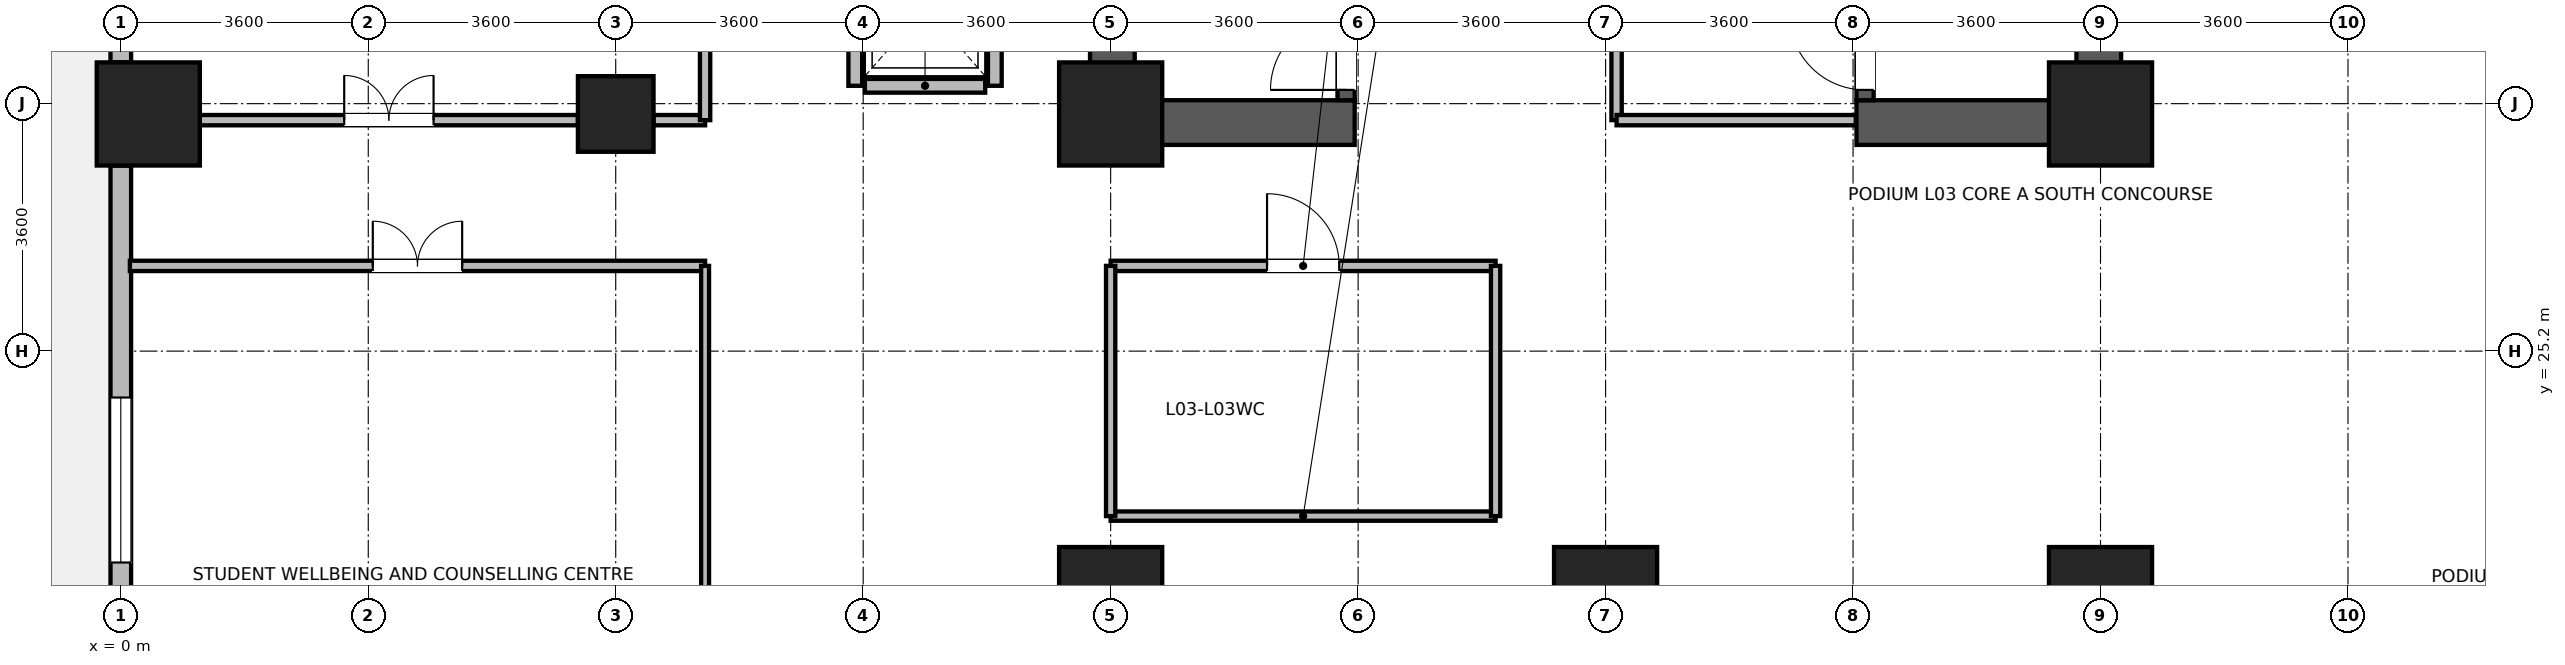
"""IFC4 building model, lengths in metres.
Left out: names, types, materials, properties, quantities, classifications, styles, units other than length and angle.
Written with IfcOpenShell. Run it as: python <this file> out.ifc"""

import sys

from ifc_helpers import new_model, si_unit, direction, frame, frame_2d, origin, origin_2d, place, context, subcontext, project, spatial, rectangle, circle, extrude, source, transform, mapped, element, fill, save


model = new_model("IFC4")
c1 = context("Model", 3, precision=1e-05, world=origin(), true_north=direction((0.0, 1.0)))
c2 = subcontext(c1, "Body", "Model", "MODEL_VIEW")
j1 = project(units=[si_unit("LENGTHUNIT", "METRE"), si_unit("PLANEANGLEUNIT", "RADIAN")], contexts=[c1])
p1 = place(None, origin())
s1 = spatial("IfcSite", under=j1, at=p1, CompositionType="ELEMENT")
p2 = place(p1, origin())
s2 = spatial("IfcBuilding", under=s1, at=p2, CompositionType="ELEMENT")
p3 = place(p2, frame((0.0, 0.0, 15.0)))
s3 = spatial("IfcBuildingStorey", under=s2, at=p3, CompositionType="ELEMENT", Elevation=15.0)
for number, where, z_axis, x_axis in (
    (1, (14.425, 28.2, 0.0), (0.0, 0.0, 1.0), (0.0, 1.0, 0.0)),
    (2, (28.775, 28.2, 0.0), (0.0, 0.0, 1.0), (0.0, 1.0, 0.0)),
):
    element("IfcWall", number, at=place(p3, frame(where, z_axis=z_axis, x_axis=x_axis)), inside=s3, PredefinedType="SHEAR", context=c2, shape_type="SweptSolid", body=[
        extrude(rectangle(XDim=8.3, YDim=0.65, at=frame_2d((4.15, 0.0))), origin(), (0.0, 0.0, 1.0), 4.38),
    ])
for number, where, z_axis, x_axis in (
    (3, (14.75, 28.525, 0.0), (0.0, 0.0, 1.0), (1.0, 0.0, 0.0)),
    (4, (25.25, 28.525, 0.0), (0.0, 0.0, 1.0), (1.0, 0.0, 0.0)),
):
    element("IfcWall", number, at=place(p3, frame(where, z_axis=z_axis, x_axis=x_axis)), inside=s3, PredefinedType="SHEAR", context=c2, shape_type="SweptSolid", body=[
        extrude(rectangle(XDim=3.2, YDim=0.65, at=frame_2d((1.6, 0.0))), origin(), (0.0, 0.0, 1.0), 4.38),
    ])
p4 = place(p3, frame((17.825, 28.85, 0.0), z_axis=(0.0, 0.0, 1.0), x_axis=(0.0, 1.0, 0.0)))
e5 = element("IfcWall", 5, at=p4, inside=s3, PredefinedType="SHEAR", context=c2, shape_type="SweptSolid", body=[
    extrude(rectangle(XDim=7.0, YDim=0.25, at=frame_2d((3.5, 0.0))), origin(), (0.0, 0.0, 1.0), 4.38),
])
p5 = place(p4, frame((0.15, 0.0, 0.0)))
e6 = element("IfcOpeningElement", 6, at=p5, cuts=e5, PredefinedType="OPENING", context=c2, shape_type="SweptSolid", body=[
    extrude(rectangle(XDim=1.1, YDim=2.08, at=frame_2d((0.55, 1.04))), frame((0.0, 0.135, 0.0), z_axis=(0.0, -1.0, 0.0), x_axis=(1.0, 0.0, 0.0)), (0.0, 0.0, 1.0), 0.27),
])
p6 = place(p3, frame((25.375, 28.85, 0.0), z_axis=(0.0, 0.0, 1.0), x_axis=(0.0, 1.0, 0.0)))
e7 = element("IfcWall", 7, at=p6, inside=s3, PredefinedType="SHEAR", context=c2, shape_type="SweptSolid", body=[
    extrude(rectangle(XDim=7.0, YDim=0.25, at=frame_2d((3.5, 0.0))), origin(), (0.0, 0.0, 1.0), 4.38),
])
p7 = place(p6, frame((0.15, 0.0, 0.0)))
e8 = element("IfcOpeningElement", 8, at=p7, cuts=e7, PredefinedType="OPENING", context=c2, shape_type="SweptSolid", body=[
    extrude(rectangle(XDim=1.1, YDim=2.08, at=frame_2d((0.55, 1.04))), frame((0.0, 0.135, 0.0), z_axis=(0.0, -1.0, 0.0), x_axis=(1.0, 0.0, 0.0)), (0.0, 0.0, 1.0), 0.27),
])
m1 = source(origin(), c2, "Body", "SweptSolid", [
    extrude(circle(Radius=0.55, at=origin_2d()), origin(), (0.0, 0.0, 1.0), 4.8),
])
p8 = place(p3, frame((7.2, 28.65, 0.0), z_axis=(0.0, 0.0, 1.0), x_axis=(1.0, 0.0, 0.0)))
e9 = element("IfcColumn", 9, at=p8, inside=s3, PredefinedType="COLUMN", context=c2, shape_type="MappedRepresentation", body=[
    mapped(m1, transform((0.0, 0.0, 0.0), x_axis=(1.0, 0.0, 0.0), y_axis=(0.0, 1.0, 0.0), z_axis=(0.0, 0.0, 1.0), scale=1.0)),
])
m2 = source(origin(), c2, "Body", "SweptSolid", [
    extrude(rectangle(XDim=1.5, YDim=1.5, at=origin_2d()), origin(), (0.0, 0.0, 1.0), 4.8),
])
for number, where, z_axis, x_axis in (
    (10, (14.4, 21.6, 0.0), (0.0, 0.0, 1.0), (1.0, 0.0, 0.0)),
    (11, (14.4, 28.65, 0.0), (0.0, 0.0, 1.0), (1.0, 0.0, 0.0)),
    (12, (21.6, 21.6, 0.0), (0.0, 0.0, 1.0), (1.0, 0.0, 0.0)),
    (13, (28.8, 21.6, 0.0), (0.0, 0.0, 1.0), (1.0, 0.0, 0.0)),
    (14, (28.8, 28.65, 0.0), (0.0, 0.0, 1.0), (1.0, 0.0, 0.0)),
    (15, (0.4, 28.65, 0.0), (0.0, 0.0, 1.0), (1.0, 0.0, 0.0)),
):
    element("IfcColumn", number, at=place(p3, frame(where, z_axis=z_axis, x_axis=x_axis)), inside=s3, PredefinedType="COLUMN", context=c2, shape_type="MappedRepresentation", body=[
        mapped(m2, transform((0.0, 0.0, 0.0), x_axis=(1.0, 0.0, 0.0), y_axis=(0.0, 1.0, 0.0), z_axis=(0.0, 0.0, 1.0), scale=1.0)),
    ])
p9 = place(p3, frame((0.0, 29.401, 0.0), z_axis=(0.0, 0.0, 1.0), x_axis=(0.0, 1.0, 0.0)))
e16 = element("IfcWall", 16, at=p9, inside=s3, PredefinedType="STANDARD", context=c2, shape_type="SweptSolid", body=[
    extrude(rectangle(XDim=5.998, YDim=0.3, at=frame_2d((2.999, 0.0))), origin(), (0.0, 0.0, 1.0), 4.36),
])
p10 = place(p9, frame((2.524, 0.0, 0.9)))
e17 = element("IfcOpeningElement", 17, at=p10, cuts=e16, PredefinedType="OPENING", context=c2, shape_type="SweptSolid", body=[
    extrude(rectangle(XDim=0.95, YDim=1.75, at=frame_2d((0.475, 0.875))), frame((0.0, 0.16, 0.0), z_axis=(0.0, -1.0, 0.0), x_axis=(1.0, 0.0, 0.0)), (0.0, 0.0, 1.0), 0.32),
])
p11 = place(p9, frame((1.037, 0.0, 0.9)))
e18 = element("IfcOpeningElement", 18, at=p11, cuts=e16, PredefinedType="OPENING", context=c2, shape_type="SweptSolid", body=[
    extrude(rectangle(XDim=0.95, YDim=1.75, at=frame_2d((0.475, 0.875))), frame((0.0, 0.16, 0.0), z_axis=(0.0, -1.0, 0.0), x_axis=(1.0, 0.0, 0.0)), (0.0, 0.0, 1.0), 0.32),
])
p12 = place(p3, frame((0.0, 18.751, 0.0), z_axis=(0.0, 0.0, 1.0), x_axis=(0.0, 1.0, 0.0)))
e19 = element("IfcWall", 19, at=p12, inside=s3, PredefinedType="STANDARD", context=c2, shape_type="SweptSolid", body=[
    extrude(rectangle(XDim=9.148, YDim=0.3, at=frame_2d((4.574, 0.0))), origin(), (0.0, 0.0, 1.0), 4.36),
])
p13 = place(p12, frame((0.325, 0.0, 0.9)))
e20 = element("IfcOpeningElement", 20, at=p13, cuts=e19, PredefinedType="OPENING", context=c2, shape_type="SweptSolid", body=[
    extrude(rectangle(XDim=2.4, YDim=2.5, at=frame_2d((1.2, 1.25))), frame((0.0, 0.16, 0.0), z_axis=(0.0, -1.0, 0.0), x_axis=(1.0, 0.0, 0.0)), (0.0, 0.0, 1.0), 0.32),
])
p14 = place(p12, frame((3.374, 0.0, 0.9)))
e21 = element("IfcOpeningElement", 21, at=p14, cuts=e19, PredefinedType="OPENING", context=c2, shape_type="SweptSolid", body=[
    extrude(rectangle(XDim=2.4, YDim=2.5, at=frame_2d((1.2, 1.25))), frame((0.0, 0.16, 0.0), z_axis=(0.0, -1.0, 0.0), x_axis=(1.0, 0.0, 0.0)), (0.0, 0.0, 1.0), 0.32),
])
p15 = place(p3, frame((10.825, 29.06, 0.0), z_axis=(0.0, 0.0, 1.0), x_axis=(1.0, 0.0, 0.0)))
e22 = element("IfcWall", 22, at=p15, inside=s3, PredefinedType="PARTITIONING", context=c2, shape_type="SweptSolid", body=[
    extrude(rectangle(XDim=1.75, YDim=0.2, at=frame_2d((0.875, 0.0))), origin(), (0.0, 0.0, 1.0), 4.36),
])
for number, where, z_axis, x_axis in (
    (23, (10.685, 29.06, 0.0), (0.0, 0.0, 1.0), (0.0, 1.0, 0.0)),
    (24, (12.715, 29.06, 0.0), (0.0, 0.0, 1.0), (0.0, 1.0, 0.0)),
):
    element("IfcWall", number, at=place(p3, frame(where, z_axis=z_axis, x_axis=x_axis)), inside=s3, PredefinedType="PARTITIONING", context=c2, shape_type="SweptSolid", body=[
        extrude(rectangle(XDim=2.28, YDim=0.2, at=frame_2d((1.14, 0.0))), origin(), (0.0, 0.0, 1.0), 4.36),
    ])
p16 = place(p3, frame((0.132, 26.44, 0.0), z_axis=(0.0, 0.0, 1.0), x_axis=(1.0, 0.0, 0.0)))
e25 = element("IfcWall", 25, at=p16, inside=s3, PredefinedType="PARTITIONING", context=c2, shape_type="SweptSolid", body=[
    extrude(rectangle(XDim=8.368, YDim=0.15, at=frame_2d((4.184, 0.0))), origin(), (0.0, 0.0, 1.0), 4.36),
])
p17 = place(p16, frame((3.534, 0.0, 0.0)))
e26 = element("IfcOpeningElement", 26, at=p17, cuts=e25, PredefinedType="OPENING", context=c2, shape_type="SweptSolid", body=[
    extrude(rectangle(XDim=1.3, YDim=2.12, at=frame_2d((0.65, 1.06))), frame((0.0, 0.085, 0.0), z_axis=(0.0, -1.0, 0.0), x_axis=(1.0, 0.0, 0.0)), (0.0, 0.0, 1.0), 0.17),
])
p18 = place(p3, frame((1.15, 28.56, 0.0), z_axis=(0.0, 0.0, 1.0), x_axis=(1.0, 0.0, 0.0)))
e27 = element("IfcWall", 27, at=p18, inside=s3, PredefinedType="PARTITIONING", context=c2, shape_type="SweptSolid", body=[
    extrude(rectangle(XDim=5.5, YDim=0.15, at=frame_2d((2.75, 0.0))), origin(), (0.0, 0.0, 1.0), 3.66),
])
p19 = place(p18, frame((2.1, 0.0, 0.0)))
e28 = element("IfcOpeningElement", 28, at=p19, cuts=e27, PredefinedType="OPENING", context=c2, shape_type="SweptSolid", body=[
    extrude(rectangle(XDim=1.3, YDim=2.12, at=frame_2d((0.65, 1.06))), frame((0.0, 0.085, 0.0), z_axis=(0.0, -1.0, 0.0), x_axis=(1.0, 0.0, 0.0)), (0.0, 0.0, 1.0), 0.17),
])
p20 = place(p3, frame((7.75, 28.56, 0.0), z_axis=(0.0, 0.0, 1.0), x_axis=(1.0, 0.0, 0.0)))
e29 = element("IfcWall", 29, at=p20, inside=s3, PredefinedType="PARTITIONING", context=c2, shape_type="SweptSolid", body=[
    extrude(rectangle(XDim=0.75, YDim=0.15, at=frame_2d((0.375, 0.0))), origin(), (0.0, 0.0, 1.0), 3.66),
])
p21 = place(p3, frame((8.5, 28.56, 0.0), z_axis=(0.0, 0.0, 1.0), x_axis=(0.0, 1.0, 0.0)))
e30 = element("IfcWall", 30, at=p21, inside=s3, PredefinedType="PARTITIONING", context=c2, shape_type="SweptSolid", body=[
    extrude(rectangle(XDim=7.68, YDim=0.15, at=frame_2d((3.84, 0.0))), origin(), (0.0, 0.0, 1.0), 4.36),
])
p22 = place(p3, frame((14.4, 26.44, 0.0), z_axis=(0.0, 0.0, 1.0), x_axis=(1.0, 0.0, 0.0)))
e31 = element("IfcWall", 31, at=p22, inside=s3, PredefinedType="PARTITIONING", context=c2, shape_type="SweptSolid", body=[
    extrude(rectangle(XDim=5.6, YDim=0.15, at=frame_2d((2.8, 0.0))), origin(), (0.0, 0.0, 1.0), 4.36),
])
p23 = place(p22, frame((2.275, 0.0, 0.0)))
e32 = element("IfcOpeningElement", 32, at=p23, cuts=e31, PredefinedType="OPENING", context=c2, shape_type="SweptSolid", body=[
    extrude(rectangle(XDim=1.05, YDim=2.12, at=frame_2d((0.525, 1.06))), frame((0.0, 0.085, 0.0), z_axis=(0.0, -1.0, 0.0), x_axis=(1.0, 0.0, 0.0)), (0.0, 0.0, 1.0), 0.17),
])
p24 = place(p3, frame((8.5, 18.132, 0.0), z_axis=(0.0, 0.0, 1.0), x_axis=(0.0, 1.0, 0.0)))
e33 = element("IfcWall", 33, at=p24, inside=s3, PredefinedType="PARTITIONING", context=c2, shape_type="SweptSolid", body=[
    extrude(rectangle(XDim=8.308, YDim=0.115, at=frame_2d((4.154, 0.0))), origin(), (0.0, 0.0, 1.0), 4.36),
])
p25 = place(p3, frame((14.4, 22.8, 0.0), z_axis=(0.0, 0.0, 1.0), x_axis=(1.0, 0.0, 0.0)))
e34 = element("IfcWall", 34, at=p25, inside=s3, PredefinedType="PARTITIONING", context=c2, shape_type="SweptSolid", body=[
    extrude(rectangle(XDim=5.6, YDim=0.135, at=frame_2d((2.8, 0.0))), origin(), (0.0, 0.0, 1.0), 4.36),
])
p26 = place(p3, frame((21.76, 28.56, 0.0), z_axis=(0.0, 0.0, 1.0), x_axis=(0.0, 1.0, 0.0)))
e35 = element("IfcWall", 35, at=p26, inside=s3, PredefinedType="PARTITIONING", context=c2, shape_type="SweptSolid", body=[
    extrude(rectangle(XDim=4.6, YDim=0.15, at=frame_2d((2.3, 0.0))), origin(), (0.0, 0.0, 1.0), 4.36),
])
p27 = place(p26, frame((1.55, 0.0, 0.0)))
e36 = element("IfcOpeningElement", 36, at=p27, cuts=e35, PredefinedType="OPENING", context=c2, shape_type="SweptSolid", body=[
    extrude(rectangle(XDim=1.5, YDim=2.1, at=frame_2d((0.75, 1.05))), frame((0.0, 0.085, 0.0), z_axis=(0.0, -1.0, 0.0), x_axis=(1.0, 0.0, 0.0)), (0.0, 0.0, 1.0), 0.17),
])
p28 = place(p3, frame((14.4, 22.8, 0.0), z_axis=(0.0, 0.0, 1.0), x_axis=(0.0, 1.0, 0.0)))
e37 = element("IfcWall", 37, at=p28, inside=s3, PredefinedType="PARTITIONING", context=c2, shape_type="SweptSolid", body=[
    extrude(rectangle(XDim=3.64, YDim=0.135, at=frame_2d((1.82, 0.0))), origin(), (0.0, 0.0, 1.0), 3.76),
])
p29 = place(p3, frame((20.0, 22.8, 0.0), z_axis=(0.0, 0.0, 1.0), x_axis=(0.0, 1.0, 0.0)))
e38 = element("IfcWall", 38, at=p29, inside=s3, PredefinedType="PARTITIONING", context=c2, shape_type="SweptSolid", body=[
    extrude(rectangle(XDim=3.64, YDim=0.135, at=frame_2d((1.82, 0.0))), origin(), (0.0, 0.0, 1.0), 4.36),
])
p30 = place(p3, frame((21.76, 28.56, 0.0), z_axis=(0.0, 0.0, 1.0), x_axis=(1.0, 0.0, 0.0)))
e39 = element("IfcWall", 39, at=p30, inside=s3, PredefinedType="PARTITIONING", context=c2, shape_type="SweptSolid", body=[
    extrude(rectangle(XDim=3.48, YDim=0.15, at=frame_2d((1.74, 0.0))), origin(), (0.0, 0.0, 1.0), 3.16),
])
p31 = place(p14, origin())
e40 = element("IfcWindow", 40, at=p31, inside=s3, PartitioningType="SINGLE_PANEL", PredefinedType="WINDOW", context=c2, shape_type="SweptSolid", body=[
    extrude(rectangle(XDim=2.4, YDim=2.5, at=frame_2d((1.2, 1.25))), frame((0.0, 0.03, 0.0), z_axis=(0.0, -1.0, 0.0), x_axis=(1.0, 0.0, 0.0)), (0.0, 0.0, 1.0), 0.06),
])
fill(e21, e40)
p32 = place(p5, origin())
e41 = element("IfcDoor", 41, at=p32, inside=s3, OperationType="SINGLE_SWING_LEFT", PredefinedType="DOOR", context=c2, shape_type="SweptSolid", body=[
    extrude(rectangle(XDim=1.1, YDim=2.08, at=frame_2d((0.55, 1.04))), frame((0.0, 0.025, 0.0), z_axis=(0.0, -1.0, 0.0), x_axis=(1.0, 0.0, 0.0)), (0.0, 0.0, 1.0), 0.05),
])
fill(e6, e41)
p33 = place(p7, origin())
e42 = element("IfcDoor", 42, at=p33, inside=s3, OperationType="SINGLE_SWING_RIGHT", PredefinedType="DOOR", context=c2, shape_type="SweptSolid", body=[
    extrude(rectangle(XDim=1.1, YDim=2.08, at=frame_2d((0.55, 1.04))), frame((0.0, 0.025, 0.0), z_axis=(0.0, -1.0, 0.0), x_axis=(1.0, 0.0, 0.0)), (0.0, 0.0, 1.0), 0.05),
])
fill(e8, e42)
p34 = place(p17, origin())
e43 = element("IfcDoor", 43, at=p34, inside=s3, OperationType="DOUBLE_DOOR_SINGLE_SWING", PredefinedType="DOOR", context=c2, shape_type="SweptSolid", body=[
    extrude(rectangle(XDim=1.3, YDim=2.12, at=frame_2d((0.65, 1.06))), frame((0.0, 0.025, 0.0), z_axis=(0.0, -1.0, 0.0), x_axis=(1.0, 0.0, 0.0)), (0.0, 0.0, 1.0), 0.05),
])
fill(e26, e43)
p35 = place(p19, origin())
e44 = element("IfcDoor", 44, at=p35, inside=s3, OperationType="DOUBLE_DOOR_SINGLE_SWING", PredefinedType="DOOR", context=c2, shape_type="SweptSolid", body=[
    extrude(rectangle(XDim=1.3, YDim=2.12, at=frame_2d((0.65, 1.06))), frame((0.0, 0.025, 0.0), z_axis=(0.0, -1.0, 0.0), x_axis=(1.0, 0.0, 0.0)), (0.0, 0.0, 1.0), 0.05),
])
fill(e28, e44)
p36 = place(p23, origin())
e45 = element("IfcDoor", 45, at=p36, inside=s3, OperationType="SINGLE_SWING_LEFT", PredefinedType="DOOR", context=c2, shape_type="SweptSolid", body=[
    extrude(rectangle(XDim=1.05, YDim=2.12, at=frame_2d((0.525, 1.06))), frame((0.0, 0.025, 0.0), z_axis=(0.0, -1.0, 0.0), x_axis=(1.0, 0.0, 0.0)), (0.0, 0.0, 1.0), 0.05),
])
fill(e32, e45)
save(model, sys.argv[1])
